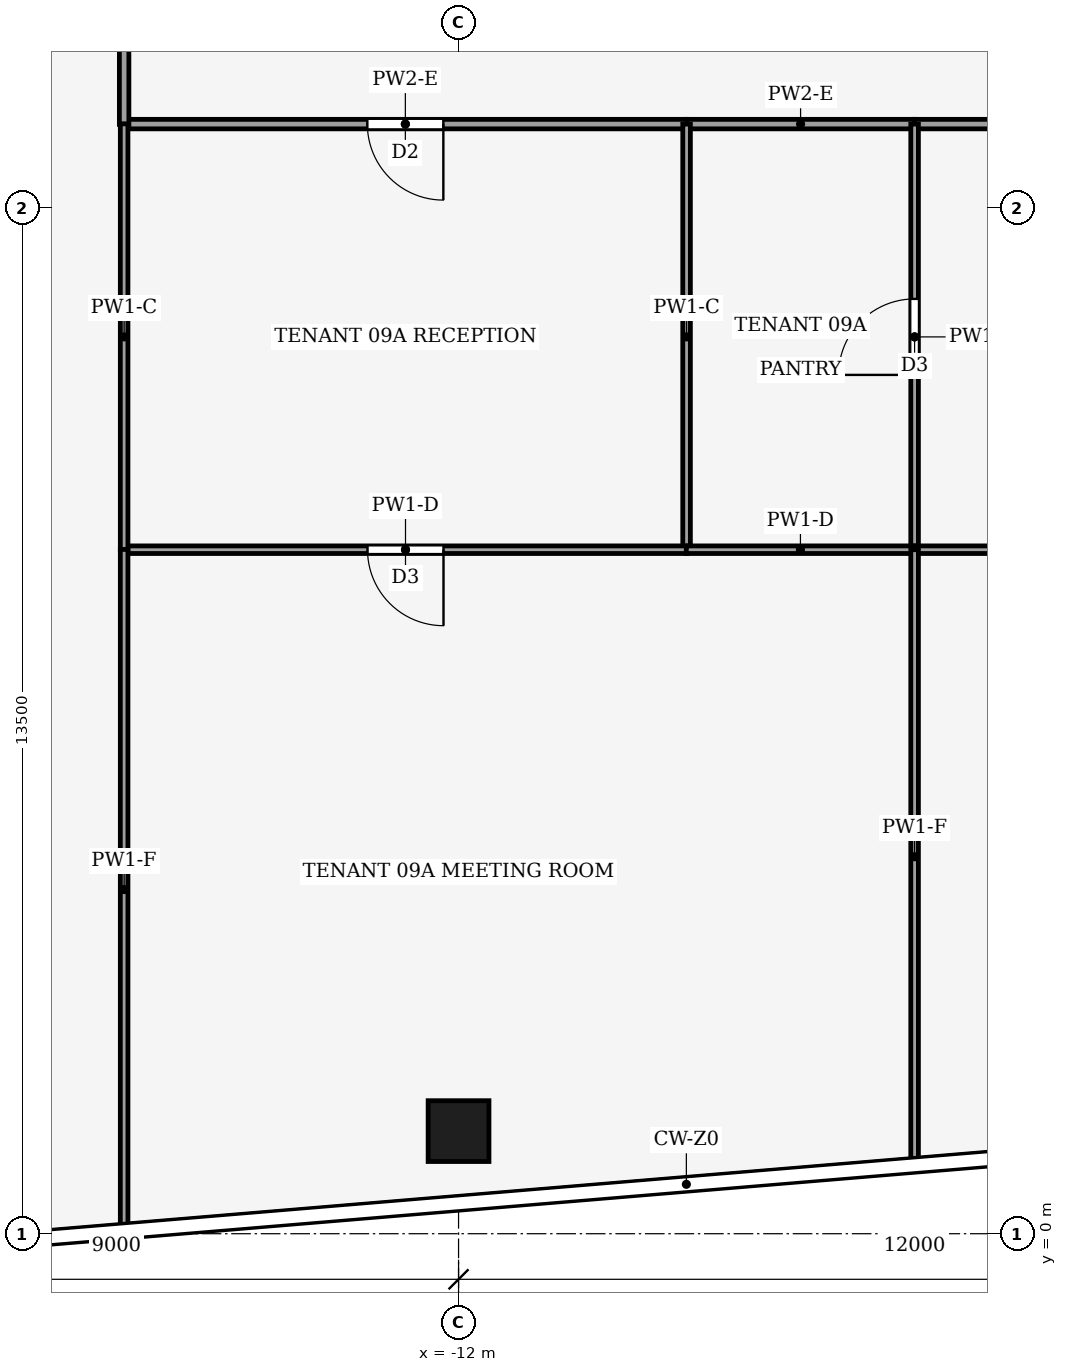
"""IFC4 building model, lengths in metres.
Left out: names, types, materials, properties, quantities, classifications, styles, units other than length and angle.
Written with IfcOpenShell. Run it as: python <this file> out.ifc"""

import sys

from ifc_helpers import new_model, si_unit, direction, frame, frame_2d, origin, origin_2d, place, context, subcontext, project, spatial, rectangle, hollow_rectangle, extrude, element, fill, save


model = new_model("IFC4")
c1 = context("Model", 3, precision=1e-05, world=origin(), true_north=direction((0.0, 1.0)))
c2 = subcontext(c1, "Body", "Model", "MODEL_VIEW")
j1 = project(units=[si_unit("LENGTHUNIT", "METRE"), si_unit("PLANEANGLEUNIT", "RADIAN")], contexts=[c1])
p1 = place(None, origin())
s1 = spatial("IfcSite", under=j1, at=p1, CompositionType="ELEMENT")
p2 = place(p1, origin())
s2 = spatial("IfcBuilding", under=s1, at=p2, CompositionType="ELEMENT")
p3 = place(p2, frame((0.0, 0.0, 42.0)))
s3 = spatial("IfcBuildingStorey", under=s2, at=p3, CompositionType="ELEMENT", Elevation=42.0)
p4 = place(p3, frame((-12.0, 1.35, 0.0), z_axis=(0.0, 0.0, 1.0), x_axis=(1.0, 0.0, 0.0)))
e1 = element("IfcColumn", 1, at=p4, inside=s3, PredefinedType="COLUMN", context=c2, shape_type="SweptSolid", body=[
    extrude(hollow_rectangle(XDim=0.8, YDim=0.8, WallThickness=0.04, at=origin_2d()), origin(), (0.0, 0.0, 1.0), 4.0),
])
p5 = place(p3, frame((-9.0, 14.6, 0.0), z_axis=(0.0, 0.0, 1.0), x_axis=(-1.0, 0.0, 0.0)))
e2 = element("IfcWall", 2, at=p5, inside=s3, PredefinedType="PARTITIONING", context=c2, shape_type="SweptSolid", body=[
    extrude(rectangle(XDim=7.4, YDim=0.125, at=frame_2d((3.7, 0.0))), origin(), (0.0, 0.0, 1.0), 3.29),
])
p6 = place(p5, frame((3.2, 0.0, 0.0)))
e3 = element("IfcOpeningElement", 3, at=p6, cuts=e2, PredefinedType="OPENING", context=c2, shape_type="SweptSolid", body=[
    extrude(rectangle(XDim=1.0, YDim=2.1, at=frame_2d((0.5, 1.05))), frame((0.0, 0.073, 0.0), z_axis=(0.0, -1.0, 0.0), x_axis=(1.0, 0.0, 0.0)), (0.0, 0.0, 1.0), 0.145),
])
p7 = place(p3, frame((-9.0, 14.6, 0.0), z_axis=(0.0, 0.0, 1.0), x_axis=(1.0, 0.0, 0.0)))
e4 = element("IfcWall", 4, at=p7, inside=s3, PredefinedType="PARTITIONING", context=c2, shape_type="SweptSolid", body=[
    extrude(rectangle(XDim=3.0, YDim=0.125, at=frame_2d((1.5, 0.0))), origin(), (0.0, 0.0, 1.0), 3.29),
])
p8 = place(p3, frame((3.0, 14.6, 0.0), z_axis=(0.0, 0.0, 1.0), x_axis=(-1.0, 0.0, 0.0)))
e5 = element("IfcWall", 5, at=p8, inside=s3, PredefinedType="PARTITIONING", context=c2, shape_type="SweptSolid", body=[
    extrude(rectangle(XDim=9.0, YDim=0.125, at=frame_2d((4.5, 0.0))), origin(), (0.0, 0.0, 1.0), 3.29),
])
p9 = place(p8, frame((4.0, 0.0, 0.0)))
e6 = element("IfcOpeningElement", 6, at=p9, cuts=e5, PredefinedType="OPENING", context=c2, shape_type="SweptSolid", body=[
    extrude(rectangle(XDim=1.0, YDim=2.1, at=frame_2d((0.5, 1.05))), frame((0.0, 0.073, 0.0), z_axis=(0.0, -1.0, 0.0), x_axis=(1.0, 0.0, 0.0)), (0.0, 0.0, 1.0), 0.145),
])
p10 = place(p3, frame((-16.4, 14.596, 0.0), z_axis=(0.0, 0.0, 1.0), x_axis=(0.0, 1.0, 0.0)))
e7 = element("IfcWall", 7, at=p10, inside=s3, PredefinedType="PARTITIONING", context=c2, shape_type="SweptSolid", body=[
    extrude(rectangle(XDim=9.404, YDim=0.125, at=frame_2d((4.702, 0.0))), origin(), (0.0, 0.0, 1.0), 3.14),
])
p11 = place(p10, frame((4.202, 0.0, 0.0)))
e8 = element("IfcOpeningElement", 8, at=p11, cuts=e7, PredefinedType="OPENING", context=c2, shape_type="SweptSolid", body=[
    extrude(rectangle(XDim=1.0, YDim=2.1, at=frame_2d((0.5, 1.05))), frame((0.0, 0.073, 0.0), z_axis=(0.0, -1.0, 0.0), x_axis=(1.0, 0.0, 0.0)), (0.0, 0.0, 1.0), 0.145),
])
p12 = place(p3, frame((-9.0, 9.0, 0.0), z_axis=(0.0, 0.0, 1.0), x_axis=(0.0, 1.0, 0.0)))
e9 = element("IfcWall", 9, at=p12, inside=s3, PredefinedType="PARTITIONING", context=c2, shape_type="SweptSolid", body=[
    extrude(rectangle(XDim=5.6, YDim=0.1, at=frame_2d((2.8, 0.0))), origin(), (0.0, 0.0, 1.0), 3.87),
])
p13 = place(p3, frame((-8.996, 9.0, 0.0), z_axis=(0.0, 0.0, 1.0), x_axis=(-1.0, 0.0, 0.0)))
e10 = element("IfcWall", 10, at=p13, inside=s3, PredefinedType="PARTITIONING", context=c2, shape_type="SweptSolid", body=[
    extrude(rectangle(XDim=7.404, YDim=0.1, at=frame_2d((3.702, 0.0))), origin(), (0.0, 0.0, 1.0), 3.29),
])
p14 = place(p13, frame((3.202, 0.0, 0.0)))
e11 = element("IfcOpeningElement", 11, at=p14, cuts=e10, PredefinedType="OPENING", context=c2, shape_type="SweptSolid", body=[
    extrude(rectangle(XDim=1.0, YDim=2.1, at=frame_2d((0.5, 1.05))), frame((0.0, 0.06, 0.0), z_axis=(0.0, -1.0, 0.0), x_axis=(1.0, 0.0, 0.0)), (0.0, 0.0, 1.0), 0.12),
])
p15 = place(p3, frame((-16.4, 14.604, 0.0), z_axis=(0.0, 0.0, 1.0), x_axis=(0.0, -1.0, 0.0)))
e12 = element("IfcWall", 12, at=p15, inside=s3, PredefinedType="PARTITIONING", context=c2, shape_type="SweptSolid", body=[
    extrude(rectangle(XDim=5.608, YDim=0.1, at=frame_2d((2.804, 0.0))), origin(), (0.0, 0.0, 1.0), 3.87),
])
p16 = place(p3, frame((-6.0, 9.0, 0.0), z_axis=(0.0, 0.0, 1.0), x_axis=(0.0, 1.0, 0.0)))
e13 = element("IfcWall", 13, at=p16, inside=s3, PredefinedType="PARTITIONING", context=c2, shape_type="SweptSolid", body=[
    extrude(rectangle(XDim=5.6, YDim=0.1, at=frame_2d((2.8, 0.0))), origin(), (0.0, 0.0, 1.0), 3.87),
])
p17 = place(p16, frame((2.3, 0.0, 0.0)))
e14 = element("IfcOpeningElement", 14, at=p17, cuts=e13, PredefinedType="OPENING", context=c2, shape_type="SweptSolid", body=[
    extrude(rectangle(XDim=1.0, YDim=2.1, at=frame_2d((0.5, 1.05))), frame((0.0, 0.06, 0.0), z_axis=(0.0, -1.0, 0.0), x_axis=(1.0, 0.0, 0.0)), (0.0, 0.0, 1.0), 0.12),
])
p18 = place(p3, frame((-9.004, 9.0, 0.0), z_axis=(0.0, 0.0, 1.0), x_axis=(1.0, 0.0, 0.0)))
e15 = element("IfcWall", 15, at=p18, inside=s3, PredefinedType="PARTITIONING", context=c2, shape_type="SweptSolid", body=[
    extrude(rectangle(XDim=3.004, YDim=0.1, at=frame_2d((1.502, 0.0))), origin(), (0.0, 0.0, 1.0), 3.29),
])
p19 = place(p3, frame((3.0, 9.0, 0.0), z_axis=(0.0, 0.0, 1.0), x_axis=(-1.0, 0.0, 0.0)))
e16 = element("IfcWall", 16, at=p19, inside=s3, PredefinedType="PARTITIONING", context=c2, shape_type="SweptSolid", body=[
    extrude(rectangle(XDim=9.0, YDim=0.1, at=frame_2d((4.5, 0.0))), origin(), (0.0, 0.0, 1.0), 3.29),
])
p20 = place(p19, frame((4.0, 0.0, 0.0)))
e17 = element("IfcOpeningElement", 17, at=p20, cuts=e16, PredefinedType="OPENING", context=c2, shape_type="SweptSolid", body=[
    extrude(rectangle(XDim=1.0, YDim=2.1, at=frame_2d((0.5, 1.05))), frame((0.0, 0.06, 0.0), z_axis=(0.0, -1.0, 0.0), x_axis=(1.0, 0.0, 0.0)), (0.0, 0.0, 1.0), 0.12),
])
p21 = place(p3, frame((-6.0, 0.92, 0.0), z_axis=(0.0, 0.0, 1.0), x_axis=(0.0, 1.0, 0.0)))
e18 = element("IfcWall", 18, at=p21, inside=s3, PredefinedType="PARTITIONING", context=c2, shape_type="SweptSolid", body=[
    extrude(rectangle(XDim=8.08, YDim=0.1, at=frame_2d((4.04, 0.0))), origin(), (0.0, 0.0, 1.0), 3.04),
])
p22 = place(p3, frame((-16.4, 9.004, 0.0), z_axis=(0.0, 0.0, 1.0), x_axis=(0.0, -1.0, 0.0)))
e19 = element("IfcWall", 19, at=p22, inside=s3, PredefinedType="PARTITIONING", context=c2, shape_type="SweptSolid", body=[
    extrude(rectangle(XDim=8.951, YDim=0.1, at=frame_2d((4.475, 0.0))), origin(), (0.0, 0.0, 1.0), 3.04),
])
p23 = place(p6, origin())
e20 = element("IfcDoor", 20, at=p23, inside=s3, OperationType="SINGLE_SWING_LEFT", PredefinedType="DOOR", context=c2, shape_type="SweptSolid", body=[
    extrude(rectangle(XDim=1.0, YDim=2.1, at=frame_2d((0.5, 1.05))), frame((0.0, 0.025, 0.0), z_axis=(0.0, -1.0, 0.0), x_axis=(1.0, 0.0, 0.0)), (0.0, 0.0, 1.0), 0.05),
])
fill(e3, e20)
p24 = place(p14, origin())
e21 = element("IfcDoor", 21, at=p24, inside=s3, OperationType="SINGLE_SWING_LEFT", PredefinedType="DOOR", context=c2, shape_type="SweptSolid", body=[
    extrude(rectangle(XDim=1.0, YDim=2.1, at=frame_2d((0.5, 1.05))), frame((0.0, 0.025, 0.0), z_axis=(0.0, -1.0, 0.0), x_axis=(1.0, 0.0, 0.0)), (0.0, 0.0, 1.0), 0.05),
])
fill(e11, e21)
p25 = place(p17, origin())
e22 = element("IfcDoor", 22, at=p25, inside=s3, OperationType="SINGLE_SWING_RIGHT", PredefinedType="DOOR", context=c2, shape_type="SweptSolid", body=[
    extrude(rectangle(XDim=1.0, YDim=2.1, at=frame_2d((0.5, 1.05))), frame((0.0, 0.025, 0.0), z_axis=(0.0, -1.0, 0.0), x_axis=(1.0, 0.0, 0.0)), (0.0, 0.0, 1.0), 0.05),
])
fill(e14, e22)
save(model, sys.argv[1])
